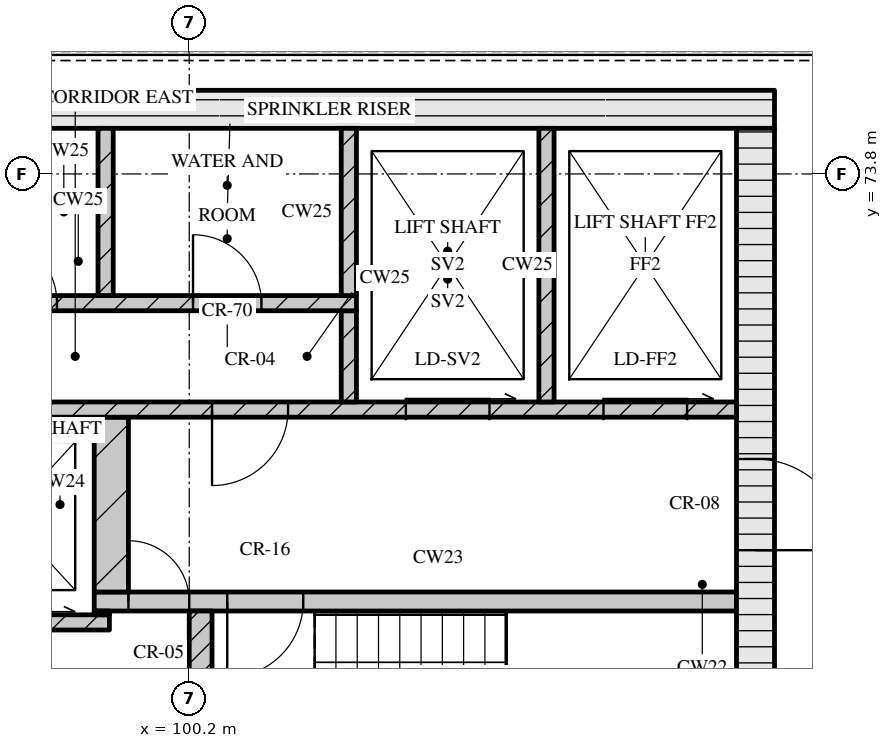
"""IFC4 building model, lengths in metres.
Left out: names, types, materials, properties, quantities, classifications, styles, units other than length and angle.
Written with IfcOpenShell. Run it as: python <this file> out.ifc"""

import sys

from ifc_helpers import new_model, si_unit, direction, frame, frame_2d, origin, place, context, subcontext, project, spatial, rectangle, extrude, element, fill, save


model = new_model("IFC4")
c1 = context("Model", 3, precision=1e-05, world=origin(), true_north=direction((0.0, 1.0)))
c2 = subcontext(c1, "Body", "Model", "MODEL_VIEW")
j1 = project(units=[si_unit("LENGTHUNIT", "METRE"), si_unit("PLANEANGLEUNIT", "RADIAN")], contexts=[c1])
p1 = place(None, origin())
s1 = spatial("IfcSite", under=j1, at=p1, CompositionType="ELEMENT")
p2 = place(p1, origin())
s2 = spatial("IfcBuilding", under=s1, at=p2, CompositionType="ELEMENT")
p3 = place(p2, frame((0.0, 0.0, 281.55)))
s3 = spatial("IfcBuildingStorey", under=s2, at=p3, CompositionType="ELEMENT", Elevation=281.55)
p4 = place(p3, frame((67.3, 74.65, 0.0), z_axis=(0.0, 0.0, 1.0), x_axis=(1.0, 0.0, 0.0)))
e1 = element("IfcWall", 1, at=p4, inside=s3, PredefinedType="SOLIDWALL", context=c2, shape_type="SweptSolid", body=[
    extrude(rectangle(XDim=40.6, YDim=0.5, at=frame_2d((20.3, 0.0))), origin(), (0.0, 0.0, 1.0), 3.32),
])
p5 = place(p3, frame((107.65, 62.4, 0.0), z_axis=(0.0, 0.0, 1.0), x_axis=(0.0, 1.0, 0.0)))
e2 = element("IfcWall", 2, at=p5, inside=s3, PredefinedType="SOLIDWALL", context=c2, shape_type="SweptSolid", body=[
    extrude(rectangle(XDim=12.0, YDim=0.5, at=frame_2d((6.0, 0.0))), origin(), (0.0, 0.0, 1.0), 3.32),
])
p6 = place(p5, frame((6.45, 0.0, 0.0)))
e3 = element("IfcOpeningElement", 3, at=p6, cuts=e2, PredefinedType="OPENING", context=c2, shape_type="SweptSolid", body=[
    extrude(rectangle(XDim=1.2, YDim=2.1, at=frame_2d((0.6, 1.05))), frame((0.0, 0.26, 0.0), z_axis=(0.0, -1.0, 0.0), x_axis=(1.0, 0.0, 0.0)), (0.0, 0.0, 1.0), 0.52),
])
p7 = place(p3, frame((100.35, 65.2, 0.0), z_axis=(0.0, 0.0, 1.0), x_axis=(0.0, 1.0, 0.0)))
e4 = element("IfcWall", 4, at=p7, inside=s3, PredefinedType="SOLIDWALL", context=c2, shape_type="SweptSolid", body=[
    extrude(rectangle(XDim=2.85, YDim=0.3, at=frame_2d((1.425, 0.0))), origin(), (0.0, 0.0, 1.0), 3.32),
])
p8 = place(p3, frame((76.05, 67.9, 0.0), z_axis=(0.0, 0.0, 1.0), x_axis=(1.0, 0.0, 0.0)))
e5 = element("IfcWall", 5, at=p8, inside=s3, PredefinedType="SOLIDWALL", context=c2, shape_type="SweptSolid", body=[
    extrude(rectangle(XDim=23.1, YDim=0.2, at=frame_2d((11.55, 0.0))), origin(), (0.0, 0.0, 1.0), 3.32),
])
p9 = place(p8, frame((1.35, 0.0, 0.0)))
e6 = element("IfcOpeningElement", 6, at=p9, cuts=e5, PredefinedType="OPENING", context=c2, shape_type="SweptSolid", body=[
    extrude(rectangle(XDim=0.9, YDim=2.1, at=frame_2d((0.45, 1.05))), frame((0.0, 0.11, 0.0), z_axis=(0.0, -1.0, 0.0), x_axis=(1.0, 0.0, 0.0)), (0.0, 0.0, 1.0), 0.22),
])
p10 = place(p8, frame((5.06, 0.0, 0.0)))
e7 = element("IfcOpeningElement", 7, at=p10, cuts=e5, PredefinedType="OPENING", context=c2, shape_type="SweptSolid", body=[
    extrude(rectangle(XDim=0.9, YDim=2.1, at=frame_2d((0.45, 1.05))), frame((0.0, 0.11, 0.0), z_axis=(0.0, -1.0, 0.0), x_axis=(1.0, 0.0, 0.0)), (0.0, 0.0, 1.0), 0.22),
])
p11 = place(p8, frame((8.45, 0.0, 0.0)))
e8 = element("IfcOpeningElement", 8, at=p11, cuts=e5, PredefinedType="OPENING", context=c2, shape_type="SweptSolid", body=[
    extrude(rectangle(XDim=0.9, YDim=2.1, at=frame_2d((0.45, 1.05))), frame((0.0, 0.11, 0.0), z_axis=(0.0, -1.0, 0.0), x_axis=(1.0, 0.0, 0.0)), (0.0, 0.0, 1.0), 0.22),
])
p12 = place(p8, frame((10.91, 0.0, 0.0)))
e9 = element("IfcOpeningElement", 9, at=p12, cuts=e5, PredefinedType="OPENING", context=c2, shape_type="SweptSolid", body=[
    extrude(rectangle(XDim=0.9, YDim=2.1, at=frame_2d((0.45, 1.05))), frame((0.0, 0.11, 0.0), z_axis=(0.0, -1.0, 0.0), x_axis=(1.0, 0.0, 0.0)), (0.0, 0.0, 1.0), 0.22),
])
p13 = place(p8, frame((13.55, 0.0, 0.0)))
e10 = element("IfcOpeningElement", 10, at=p13, cuts=e5, PredefinedType="OPENING", context=c2, shape_type="SweptSolid", body=[
    extrude(rectangle(XDim=1.0, YDim=2.1, at=frame_2d((0.5, 1.05))), frame((0.0, 0.11, 0.0), z_axis=(0.0, -1.0, 0.0), x_axis=(1.0, 0.0, 0.0)), (0.0, 0.0, 1.0), 0.22),
])
p14 = place(p8, frame((16.2, 0.0, 0.0)))
e11 = element("IfcOpeningElement", 11, at=p14, cuts=e5, PredefinedType="OPENING", context=c2, shape_type="SweptSolid", body=[
    extrude(rectangle(XDim=1.1, YDim=2.1, at=frame_2d((0.55, 1.05))), frame((0.0, 0.11, 0.0), z_axis=(0.0, -1.0, 0.0), x_axis=(1.0, 0.0, 0.0)), (0.0, 0.0, 1.0), 0.22),
])
p15 = place(p8, frame((18.7, 0.0, 0.0)))
e12 = element("IfcOpeningElement", 12, at=p15, cuts=e5, PredefinedType="OPENING", context=c2, shape_type="SweptSolid", body=[
    extrude(rectangle(XDim=1.1, YDim=2.1, at=frame_2d((0.55, 1.05))), frame((0.0, 0.11, 0.0), z_axis=(0.0, -1.0, 0.0), x_axis=(1.0, 0.0, 0.0)), (0.0, 0.0, 1.0), 0.22),
])
p16 = place(p8, frame((21.2, 0.0, 0.0)))
e13 = element("IfcOpeningElement", 13, at=p16, cuts=e5, PredefinedType="OPENING", context=c2, shape_type="SweptSolid", body=[
    extrude(rectangle(XDim=1.1, YDim=2.1, at=frame_2d((0.55, 1.05))), frame((0.0, 0.11, 0.0), z_axis=(0.0, -1.0, 0.0), x_axis=(1.0, 0.0, 0.0)), (0.0, 0.0, 1.0), 0.22),
])
p17 = place(p3, frame((98.95, 68.025, 0.0), z_axis=(0.0, 0.0, 1.0), x_axis=(1.0, 0.0, 0.0)))
e14 = element("IfcWall", 14, at=p17, inside=s3, PredefinedType="SOLIDWALL", context=c2, shape_type="SweptSolid", body=[
    extrude(rectangle(XDim=0.2, YDim=0.05, at=frame_2d((0.1, 0.0))), origin(), (0.0, 0.0, 1.0), 3.32),
])
p18 = place(p3, frame((98.95, 68.175, 0.0), z_axis=(0.0, 0.0, 1.0), x_axis=(1.0, 0.0, 0.0)))
e15 = element("IfcWall", 15, at=p18, inside=s3, PredefinedType="SOLIDWALL", context=c2, shape_type="SweptSolid", body=[
    extrude(rectangle(XDim=8.45, YDim=0.25, at=frame_2d((4.225, 0.0))), origin(), (0.0, 0.0, 1.0), 3.32),
])
p19 = place(p18, frame((0.45, 0.0, 0.0)))
e16 = element("IfcOpeningElement", 16, at=p19, cuts=e15, PredefinedType="OPENING", context=c2, shape_type="SweptSolid", body=[
    extrude(rectangle(XDim=0.8, YDim=2.1, at=frame_2d((0.4, 1.05))), frame((0.0, 0.135, 0.0), z_axis=(0.0, -1.0, 0.0), x_axis=(1.0, 0.0, 0.0)), (0.0, 0.0, 1.0), 0.27),
])
p20 = place(p18, frame((1.75, 0.0, 0.0)))
e17 = element("IfcOpeningElement", 17, at=p20, cuts=e15, PredefinedType="OPENING", context=c2, shape_type="SweptSolid", body=[
    extrude(rectangle(XDim=1.0, YDim=2.1, at=frame_2d((0.5, 1.05))), frame((0.0, 0.135, 0.0), z_axis=(0.0, -1.0, 0.0), x_axis=(1.0, 0.0, 0.0)), (0.0, 0.0, 1.0), 0.27),
])
p21 = place(p3, frame((99.175, 68.3, 0.0), z_axis=(0.0, 0.0, 1.0), x_axis=(0.0, 1.0, 0.0)))
e18 = element("IfcWall", 18, at=p21, inside=s3, PredefinedType="SOLIDWALL", context=c2, shape_type="SweptSolid", body=[
    extrude(rectangle(XDim=2.3, YDim=0.45, at=frame_2d((1.15, 0.0))), origin(), (0.0, 0.0, 1.0), 3.32),
])
p22 = place(p3, frame((67.8, 70.7, 0.0), z_axis=(0.0, 0.0, 1.0), x_axis=(1.0, 0.0, 0.0)))
e19 = element("IfcWall", 19, at=p22, inside=s3, PredefinedType="SOLIDWALL", context=c2, shape_type="SweptSolid", body=[
    extrude(rectangle(XDim=39.6, YDim=0.2, at=frame_2d((19.8, 0.0))), origin(), (0.0, 0.0, 1.0), 3.32),
])
p23 = place(p22, frame((0.65, 0.0, 0.0)))
e20 = element("IfcOpeningElement", 20, at=p23, cuts=e19, PredefinedType="OPENING", context=c2, shape_type="SweptSolid", body=[
    extrude(rectangle(XDim=1.1, YDim=2.1, at=frame_2d((0.55, 1.05))), frame((0.0, 0.11, 0.0), z_axis=(0.0, -1.0, 0.0), x_axis=(1.0, 0.0, 0.0)), (0.0, 0.0, 1.0), 0.22),
])
p24 = place(p22, frame((3.25, 0.0, 0.0)))
e21 = element("IfcOpeningElement", 21, at=p24, cuts=e19, PredefinedType="OPENING", context=c2, shape_type="SweptSolid", body=[
    extrude(rectangle(XDim=1.1, YDim=2.1, at=frame_2d((0.55, 1.05))), frame((0.0, 0.11, 0.0), z_axis=(0.0, -1.0, 0.0), x_axis=(1.0, 0.0, 0.0)), (0.0, 0.0, 1.0), 0.22),
])
p25 = place(p22, frame((5.9, 0.0, 0.0)))
e22 = element("IfcOpeningElement", 22, at=p25, cuts=e19, PredefinedType="OPENING", context=c2, shape_type="SweptSolid", body=[
    extrude(rectangle(XDim=1.0, YDim=2.1, at=frame_2d((0.5, 1.05))), frame((0.0, 0.11, 0.0), z_axis=(0.0, -1.0, 0.0), x_axis=(1.0, 0.0, 0.0)), (0.0, 0.0, 1.0), 0.22),
])
p26 = place(p22, frame((21.7, 0.0, 0.0)))
e23 = element("IfcOpeningElement", 23, at=p26, cuts=e19, PredefinedType="OPENING", context=c2, shape_type="SweptSolid", body=[
    extrude(rectangle(XDim=1.0, YDim=2.1, at=frame_2d((0.5, 1.05))), frame((0.0, 0.11, 0.0), z_axis=(0.0, -1.0, 0.0), x_axis=(1.0, 0.0, 0.0)), (0.0, 0.0, 1.0), 0.22),
])
p27 = place(p22, frame((32.7, 0.0, 0.0)))
e24 = element("IfcOpeningElement", 24, at=p27, cuts=e19, PredefinedType="OPENING", context=c2, shape_type="SweptSolid", body=[
    extrude(rectangle(XDim=1.0, YDim=2.1, at=frame_2d((0.5, 1.05))), frame((0.0, 0.11, 0.0), z_axis=(0.0, -1.0, 0.0), x_axis=(1.0, 0.0, 0.0)), (0.0, 0.0, 1.0), 0.22),
])
p28 = place(p22, frame((35.25, 0.0, 0.0)))
e25 = element("IfcOpeningElement", 25, at=p28, cuts=e19, PredefinedType="OPENING", context=c2, shape_type="SweptSolid", body=[
    extrude(rectangle(XDim=1.1, YDim=2.1, at=frame_2d((0.55, 1.05))), frame((0.0, 0.11, 0.0), z_axis=(0.0, -1.0, 0.0), x_axis=(1.0, 0.0, 0.0)), (0.0, 0.0, 1.0), 0.22),
])
p29 = place(p22, frame((37.85, 0.0, 0.0)))
e26 = element("IfcOpeningElement", 26, at=p29, cuts=e19, PredefinedType="OPENING", context=c2, shape_type="SweptSolid", body=[
    extrude(rectangle(XDim=1.1, YDim=2.1, at=frame_2d((0.55, 1.05))), frame((0.0, 0.11, 0.0), z_axis=(0.0, -1.0, 0.0), x_axis=(1.0, 0.0, 0.0)), (0.0, 0.0, 1.0), 0.22),
])
p30 = place(p3, frame((102.3, 70.8, 0.0), z_axis=(0.0, 0.0, 1.0), x_axis=(0.0, 1.0, 0.0)))
e27 = element("IfcWall", 27, at=p30, inside=s3, PredefinedType="SOLIDWALL", context=c2, shape_type="SweptSolid", body=[
    extrude(rectangle(XDim=1.2, YDim=0.2, at=frame_2d((0.6, 0.0))), origin(), (0.0, 0.0, 1.0), 3.32),
])
p31 = place(p3, frame((104.9, 70.8, 0.0), z_axis=(0.0, 0.0, 1.0), x_axis=(0.0, 1.0, 0.0)))
e28 = element("IfcWall", 28, at=p31, inside=s3, PredefinedType="SOLIDWALL", context=c2, shape_type="SweptSolid", body=[
    extrude(rectangle(XDim=3.6, YDim=0.2, at=frame_2d((1.8, 0.0))), origin(), (0.0, 0.0, 1.0), 3.32),
])
p32 = place(p3, frame((95.08, 72.1, 0.0), z_axis=(0.0, 0.0, 1.0), x_axis=(1.0, 0.0, 0.0)))
e29 = element("IfcWall", 29, at=p32, inside=s3, PredefinedType="SOLIDWALL", context=c2, shape_type="SweptSolid", body=[
    extrude(rectangle(XDim=7.32, YDim=0.2, at=frame_2d((3.66, 0.0))), origin(), (0.0, 0.0, 1.0), 3.32),
])
p33 = place(p32, frame((0.52, 0.0, 0.0)))
e30 = element("IfcOpeningElement", 30, at=p33, cuts=e29, PredefinedType="OPENING", context=c2, shape_type="SweptSolid", body=[
    extrude(rectangle(XDim=0.9, YDim=2.1, at=frame_2d((0.45, 1.05))), frame((0.0, 0.11, 0.0), z_axis=(0.0, -1.0, 0.0), x_axis=(1.0, 0.0, 0.0)), (0.0, 0.0, 1.0), 0.22),
])
p34 = place(p32, frame((2.48, 0.0, 0.0)))
e31 = element("IfcOpeningElement", 31, at=p34, cuts=e29, PredefinedType="OPENING", context=c2, shape_type="SweptSolid", body=[
    extrude(rectangle(XDim=0.9, YDim=2.1, at=frame_2d((0.45, 1.05))), frame((0.0, 0.11, 0.0), z_axis=(0.0, -1.0, 0.0), x_axis=(1.0, 0.0, 0.0)), (0.0, 0.0, 1.0), 0.22),
])
p35 = place(p32, frame((5.17, 0.0, 0.0)))
e32 = element("IfcOpeningElement", 32, at=p35, cuts=e29, PredefinedType="OPENING", context=c2, shape_type="SweptSolid", body=[
    extrude(rectangle(XDim=0.9, YDim=2.1, at=frame_2d((0.45, 1.05))), frame((0.0, 0.11, 0.0), z_axis=(0.0, -1.0, 0.0), x_axis=(1.0, 0.0, 0.0)), (0.0, 0.0, 1.0), 0.22),
])
for number, where, z_axis, x_axis in (
    (33, (99.1, 72.2, 0.0), (0.0, 0.0, 1.0), (0.0, 1.0, 0.0)),
    (34, (102.3, 72.2, 0.0), (0.0, 0.0, 1.0), (0.0, 1.0, 0.0)),
):
    element("IfcWall", number, at=place(p3, frame(where, z_axis=z_axis, x_axis=x_axis)), inside=s3, PredefinedType="SOLIDWALL", context=c2, shape_type="SweptSolid", body=[
        extrude(rectangle(XDim=2.2, YDim=0.2, at=frame_2d((1.1, 0.0))), origin(), (0.0, 0.0, 1.0), 3.32),
    ])
p36 = place(p19, origin())
e35 = element("IfcDoor", 35, at=p36, inside=s3, OperationType="SINGLE_SWING_LEFT", PredefinedType="DOOR", context=c2, shape_type="SweptSolid", body=[
    extrude(rectangle(XDim=0.8, YDim=2.1, at=frame_2d((0.4, 1.05))), frame((0.0, 0.025, 0.0), z_axis=(0.0, -1.0, 0.0), x_axis=(1.0, 0.0, 0.0)), (0.0, 0.0, 1.0), 0.05),
])
fill(e16, e35)
p37 = place(p20, origin())
e36 = element("IfcDoor", 36, at=p37, inside=s3, OperationType="SINGLE_SWING_RIGHT", PredefinedType="DOOR", context=c2, shape_type="SweptSolid", body=[
    extrude(rectangle(XDim=1.0, YDim=2.1, at=frame_2d((0.5, 1.05))), frame((0.0, 0.025, 0.0), z_axis=(0.0, -1.0, 0.0), x_axis=(1.0, 0.0, 0.0)), (0.0, 0.0, 1.0), 0.05),
])
fill(e17, e36)
p38 = place(p6, origin())
e37 = element("IfcDoor", 37, at=p38, inside=s3, OperationType="SINGLE_SWING_RIGHT", PredefinedType="DOOR", context=c2, shape_type="SweptSolid", body=[
    extrude(rectangle(XDim=1.2, YDim=2.1, at=frame_2d((0.6, 1.05))), frame((0.0, 0.025, 0.0), z_axis=(0.0, -1.0, 0.0), x_axis=(1.0, 0.0, 0.0)), (0.0, 0.0, 1.0), 0.05),
])
fill(e3, e37)
p39 = place(p27, origin())
e38 = element("IfcDoor", 38, at=p39, inside=s3, OperationType="SINGLE_SWING_RIGHT", PredefinedType="DOOR", context=c2, shape_type="SweptSolid", body=[
    extrude(rectangle(XDim=1.0, YDim=2.1, at=frame_2d((0.5, 1.05))), frame((0.0, 0.025, 0.0), z_axis=(0.0, -1.0, 0.0), x_axis=(1.0, 0.0, 0.0)), (0.0, 0.0, 1.0), 0.05),
])
fill(e24, e38)
p40 = place(p28, origin())
e39 = element("IfcDoor", 39, at=p40, inside=s3, OperationType="SLIDING_TO_RIGHT", PredefinedType="DOOR", context=c2, shape_type="SweptSolid", body=[
    extrude(rectangle(XDim=1.1, YDim=2.1, at=frame_2d((0.55, 1.05))), frame((0.0, 0.025, 0.0), z_axis=(0.0, -1.0, 0.0), x_axis=(1.0, 0.0, 0.0)), (0.0, 0.0, 1.0), 0.05),
])
fill(e25, e39)
p41 = place(p29, origin())
e40 = element("IfcDoor", 40, at=p41, inside=s3, OperationType="SLIDING_TO_RIGHT", PredefinedType="DOOR", context=c2, shape_type="SweptSolid", body=[
    extrude(rectangle(XDim=1.1, YDim=2.1, at=frame_2d((0.55, 1.05))), frame((0.0, 0.025, 0.0), z_axis=(0.0, -1.0, 0.0), x_axis=(1.0, 0.0, 0.0)), (0.0, 0.0, 1.0), 0.05),
])
fill(e26, e40)
p42 = place(p34, origin())
e41 = element("IfcDoor", 41, at=p42, inside=s3, OperationType="SINGLE_SWING_LEFT", PredefinedType="DOOR", context=c2, shape_type="SweptSolid", body=[
    extrude(rectangle(XDim=0.9, YDim=2.1, at=frame_2d((0.45, 1.05))), frame((0.0, 0.025, 0.0), z_axis=(0.0, -1.0, 0.0), x_axis=(1.0, 0.0, 0.0)), (0.0, 0.0, 1.0), 0.05),
])
fill(e31, e41)
p43 = place(p35, origin())
e42 = element("IfcDoor", 42, at=p43, inside=s3, OperationType="SINGLE_SWING_LEFT", PredefinedType="DOOR", context=c2, shape_type="SweptSolid", body=[
    extrude(rectangle(XDim=0.9, YDim=2.1, at=frame_2d((0.45, 1.05))), frame((0.0, 0.025, 0.0), z_axis=(0.0, -1.0, 0.0), x_axis=(1.0, 0.0, 0.0)), (0.0, 0.0, 1.0), 0.05),
])
fill(e32, e42)
save(model, sys.argv[1])
